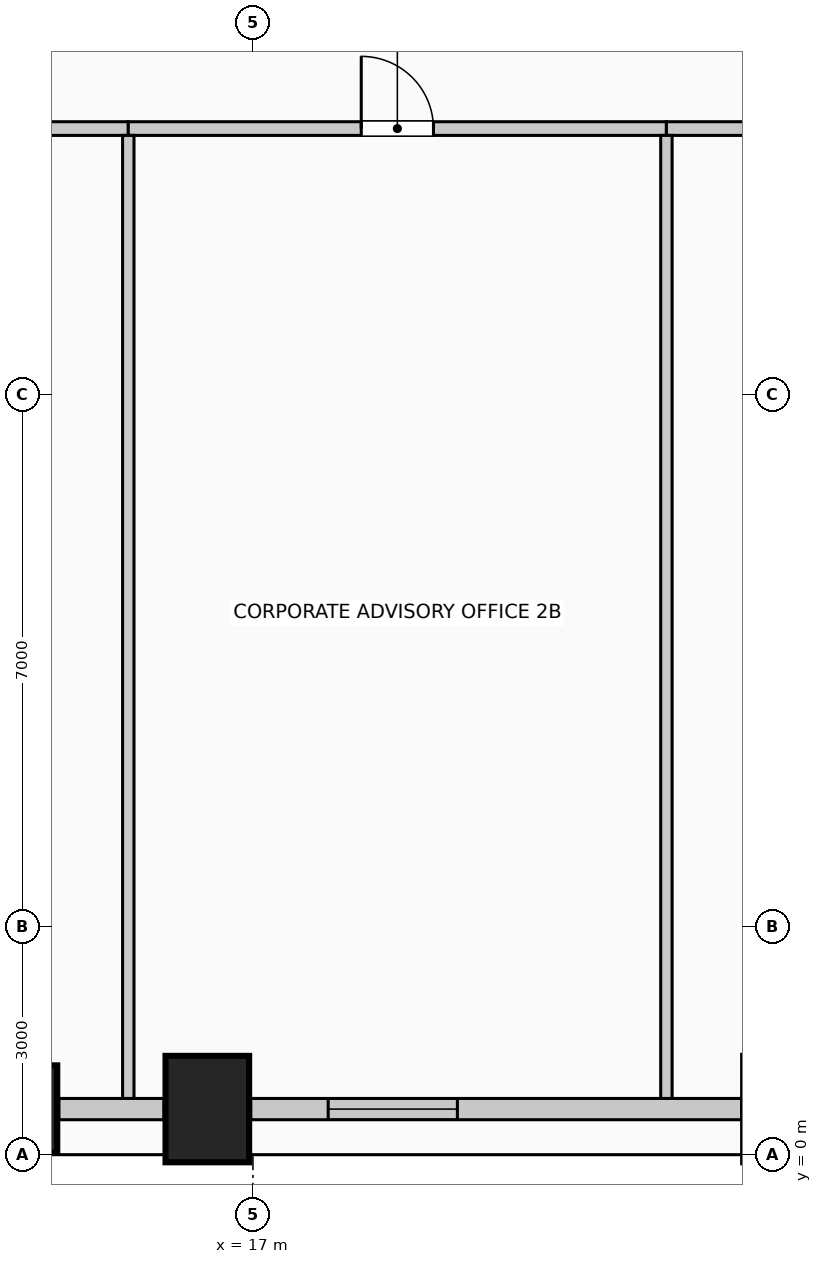
"""IFC4 building model, lengths in metres.
Left out: names, types, materials, properties, quantities, classifications, styles, units other than length and angle.
Written with IfcOpenShell. Run it as: python <this file> out.ifc"""

import sys

from ifc_helpers import new_model, si_unit, direction, frame, frame_2d, origin, origin_2d, place, context, subcontext, project, spatial, rectangle, extrude, element, fill, save


model = new_model("IFC4")
c1 = context("Model", 3, precision=1e-05, world=origin(), true_north=direction((0.0, 1.0)))
c2 = subcontext(c1, "Body", "Model", "MODEL_VIEW")
j1 = project(units=[si_unit("LENGTHUNIT", "METRE"), si_unit("PLANEANGLEUNIT", "RADIAN")], contexts=[c1])
p1 = place(None, origin())
s1 = spatial("IfcSite", under=j1, at=p1, CompositionType="ELEMENT")
p2 = place(p1, origin())
s2 = spatial("IfcBuilding", under=s1, at=p2, CompositionType="ELEMENT")
p3 = place(p2, frame((0.0, 0.0, 128.6)))
s3 = spatial("IfcBuildingStorey", under=s2, at=p3, CompositionType="ELEMENT", Elevation=128.6)
p4 = place(p3, frame((14.0, 0.6, 0.0), z_axis=(0.0, 0.0, 1.0), x_axis=(1.0, 0.0, 0.0)))
e1 = element("IfcColumn", 1, at=p4, inside=s3, PredefinedType="COLUMN", context=c2, shape_type="SweptSolid", body=[
    extrude(rectangle(XDim=0.85, YDim=1.15, at=origin_2d()), origin(), (0.0, 0.0, 1.0), 4.0),
])
p5 = place(p3, frame((16.4, 0.6, 0.0), z_axis=(0.0, 0.0, 1.0), x_axis=(1.0, 0.0, 0.0)))
e2 = element("IfcColumn", 2, at=p5, inside=s3, PredefinedType="COLUMN", context=c2, shape_type="SweptSolid", body=[
    extrude(rectangle(XDim=1.1, YDim=1.4, at=origin_2d()), origin(), (0.0, 0.0, 1.0), 4.0),
])
p6 = place(p3, frame((15.83, 0.6, 0.0), z_axis=(0.0, 0.0, 1.0), x_axis=(-1.0, 0.0, 0.0)))
e3 = element("IfcWall", 3, at=p6, inside=s3, PredefinedType="SOLIDWALL", context=c2, shape_type="SweptSolid", body=[
    extrude(rectangle(XDim=1.385, YDim=0.28, at=frame_2d((0.692, 0.0))), origin(), (0.0, 0.0, 1.0), 2.875),
])
p7 = place(p3, frame((23.43, 0.6, 0.0), z_axis=(0.0, 0.0, 1.0), x_axis=(-1.0, 0.0, 0.0)))
e4 = element("IfcWall", 4, at=p7, inside=s3, PredefinedType="SOLIDWALL", context=c2, shape_type="SweptSolid", body=[
    extrude(rectangle(XDim=6.46, YDim=0.28, at=frame_2d((3.23, 0.0))), origin(), (0.0, 0.0, 1.0), 2.875),
])
p8 = place(p7, frame((3.74, 0.0, 0.5)))
e5 = element("IfcOpeningElement", 5, at=p8, cuts=e4, PredefinedType="OPENING", context=c2, shape_type="SweptSolid", body=[
    extrude(rectangle(XDim=1.7, YDim=1.95, at=frame_2d((0.85, 0.975))), frame((0.0, 0.15, 0.0), z_axis=(0.0, -1.0, 0.0), x_axis=(1.0, 0.0, 0.0)), (0.0, 0.0, 1.0), 0.3),
])
p9 = place(p3, frame((10.64, 13.5, 0.0), z_axis=(0.0, 0.0, 1.0), x_axis=(1.0, 0.0, 0.0)))
e6 = element("IfcWall", 6, at=p9, inside=s3, PredefinedType="PARTITIONING", context=c2, shape_type="SweptSolid", body=[
    extrude(rectangle(XDim=4.72, YDim=0.18, at=frame_2d((2.36, 0.0))), origin(), (0.0, 0.0, 1.0), 3.725),
])
p10 = place(p9, frame((1.835, 0.0, 0.0)))
e7 = element("IfcOpeningElement", 7, at=p10, cuts=e6, PredefinedType="OPENING", context=c2, shape_type="SweptSolid", body=[
    extrude(rectangle(XDim=1.05, YDim=2.15, at=frame_2d((0.525, 1.075))), frame((0.0, 0.1, 0.0), z_axis=(0.0, -1.0, 0.0), x_axis=(1.0, 0.0, 0.0)), (0.0, 0.0, 1.0), 0.2),
])
p11 = place(p3, frame((15.36, 13.5, 0.0), z_axis=(0.0, 0.0, 1.0), x_axis=(1.0, 0.0, 0.0)))
e8 = element("IfcWall", 8, at=p11, inside=s3, PredefinedType="PARTITIONING", context=c2, shape_type="SweptSolid", body=[
    extrude(rectangle(XDim=7.08, YDim=0.18, at=frame_2d((3.54, 0.0))), origin(), (0.0, 0.0, 1.0), 3.725),
])
p12 = place(p11, frame((3.065, 0.0, 0.0)))
e9 = element("IfcOpeningElement", 9, at=p12, cuts=e8, PredefinedType="OPENING", context=c2, shape_type="SweptSolid", body=[
    extrude(rectangle(XDim=0.95, YDim=2.15, at=frame_2d((0.475, 1.075))), frame((0.0, 0.1, 0.0), z_axis=(0.0, -1.0, 0.0), x_axis=(1.0, 0.0, 0.0)), (0.0, 0.0, 1.0), 0.2),
])
p13 = place(p3, frame((22.44, 13.5, 0.0), z_axis=(0.0, 0.0, 1.0), x_axis=(1.0, 0.0, 0.0)))
e10 = element("IfcWall", 10, at=p13, inside=s3, PredefinedType="PARTITIONING", context=c2, shape_type="SweptSolid", body=[
    extrude(rectangle(XDim=11.8, YDim=0.18, at=frame_2d((5.9, 0.0))), origin(), (0.0, 0.0, 1.0), 3.725),
])
p14 = place(p13, frame((5.375, 0.0, 0.0)))
e11 = element("IfcOpeningElement", 11, at=p14, cuts=e10, PredefinedType="OPENING", context=c2, shape_type="SweptSolid", body=[
    extrude(rectangle(XDim=1.05, YDim=2.15, at=frame_2d((0.525, 1.075))), frame((0.0, 0.1, 0.0), z_axis=(0.0, -1.0, 0.0), x_axis=(1.0, 0.0, 0.0)), (0.0, 0.0, 1.0), 0.2),
])
for number, where, z_axis, x_axis in (
    (12, (15.36, 0.74, 0.0), (0.0, 0.0, 1.0), (0.0, 1.0, 0.0)),
    (13, (22.44, 0.74, 0.0), (0.0, 0.0, 1.0), (0.0, 1.0, 0.0)),
):
    element("IfcWall", number, at=place(p3, frame(where, z_axis=z_axis, x_axis=x_axis)), inside=s3, PredefinedType="PARTITIONING", context=c2, shape_type="SweptSolid", body=[
        extrude(rectangle(XDim=12.67, YDim=0.15, at=frame_2d((6.335, 0.0))), origin(), (0.0, 0.0, 1.0), 3.725),
    ])
p15 = place(p8, origin())
e14 = element("IfcWindow", 14, at=p15, inside=s3, PartitioningType="SINGLE_PANEL", PredefinedType="WINDOW", context=c2, shape_type="SweptSolid", body=[
    extrude(rectangle(XDim=1.7, YDim=1.95, at=frame_2d((0.85, 0.975))), frame((0.0, 0.03, 0.0), z_axis=(0.0, -1.0, 0.0), x_axis=(1.0, 0.0, 0.0)), (0.0, 0.0, 1.0), 0.06),
])
fill(e5, e14)
p16 = place(p12, origin())
e15 = element("IfcDoor", 15, at=p16, inside=s3, OperationType="SINGLE_SWING_LEFT", PredefinedType="DOOR", context=c2, shape_type="SweptSolid", body=[
    extrude(rectangle(XDim=0.95, YDim=2.15, at=frame_2d((0.475, 1.075))), frame((0.0, 0.025, 0.0), z_axis=(0.0, -1.0, 0.0), x_axis=(1.0, 0.0, 0.0)), (0.0, 0.0, 1.0), 0.05),
])
fill(e9, e15)
save(model, sys.argv[1])
